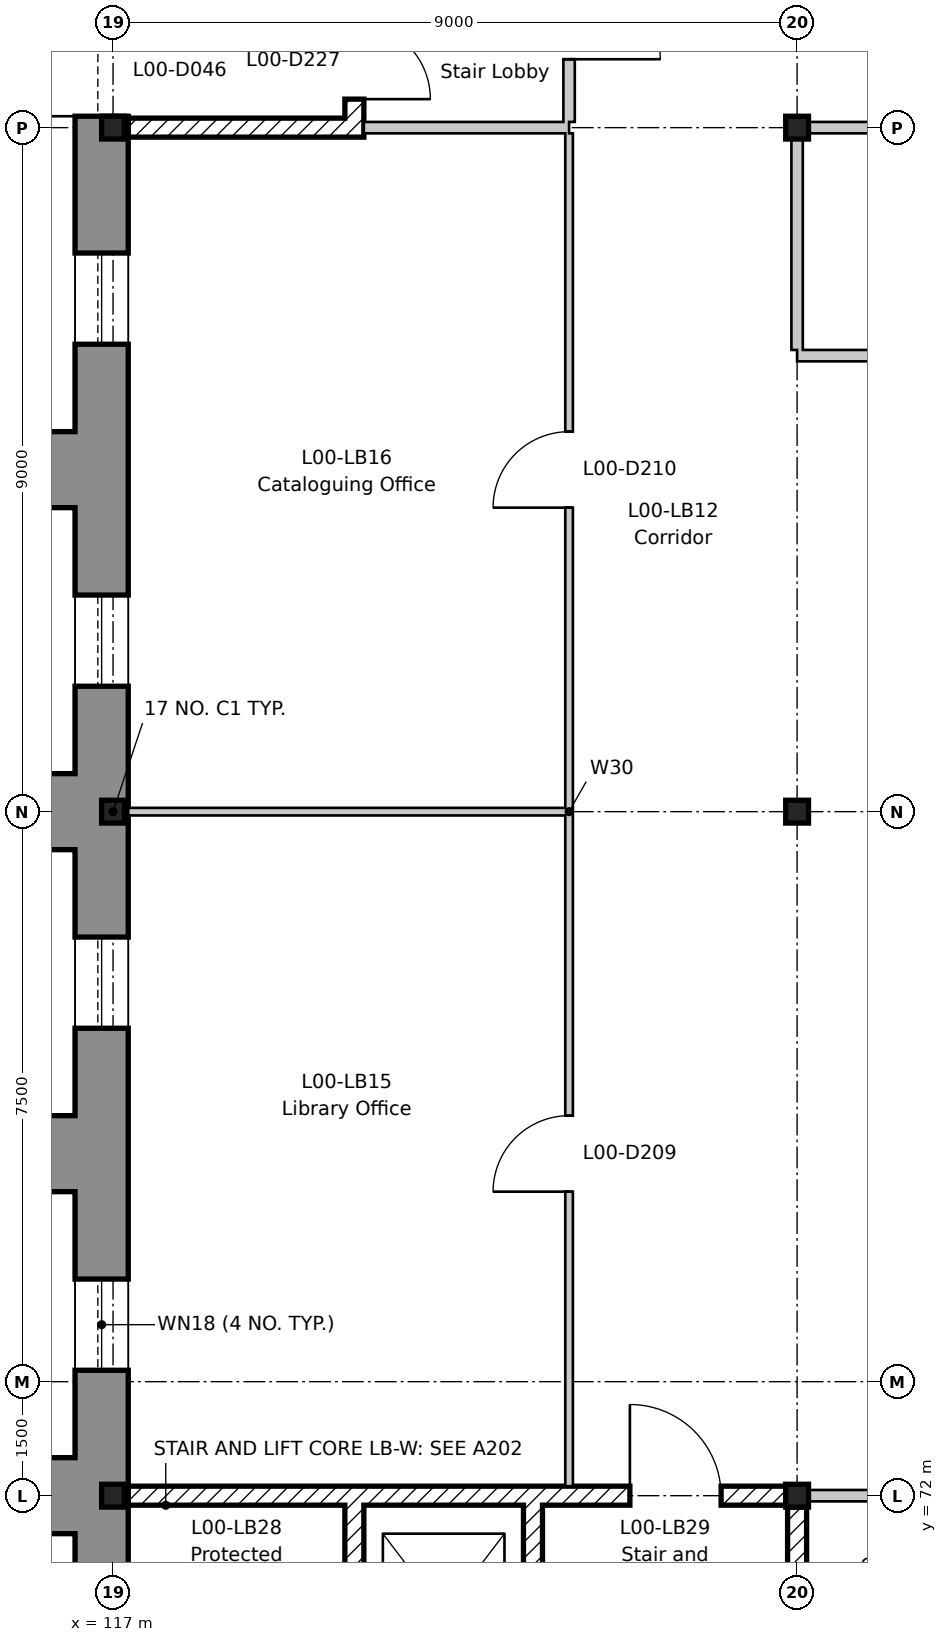
"""IFC4 building model, lengths in metres.
Left out: names, types, materials, properties, quantities, classifications, styles, units other than length and angle.
Written with IfcOpenShell. Run it as: python <this file> out.ifc"""

import sys

from ifc_helpers import new_model, si_unit, direction, frame, frame_2d, origin, origin_2d, place, context, subcontext, project, spatial, rectangle, i_section, extrude, element, fill, save


model = new_model("IFC4")
c1 = context("Model", 3, precision=1e-05, world=origin(), true_north=direction((0.0, 1.0)))
c2 = subcontext(c1, "Body", "Model", "MODEL_VIEW")
j1 = project(units=[si_unit("LENGTHUNIT", "METRE"), si_unit("PLANEANGLEUNIT", "RADIAN")], contexts=[c1])
p1 = place(None, origin())
s1 = spatial("IfcSite", under=j1, at=p1, CompositionType="ELEMENT")
p2 = place(p1, origin())
s2 = spatial("IfcBuilding", under=s1, at=p2, CompositionType="ELEMENT")
p3 = place(p2, origin())
s3 = spatial("IfcBuildingStorey", under=s2, at=p3, CompositionType="ELEMENT", Elevation=0.0)
for number, where, z_axis, x_axis in (
    (1, (117.0, 72.0, -0.6), (0.0, 0.0, 1.0), (1.0, 0.0, 0.0)),
    (2, (117.0, 81.0, -0.6), (0.0, 0.0, 1.0), (1.0, 0.0, 0.0)),
    (3, (117.0, 90.0, -0.6), (0.0, 0.0, 1.0), (1.0, 0.0, 0.0)),
    (4, (126.0, 72.0, -0.6), (0.0, 0.0, 1.0), (1.0, 0.0, 0.0)),
    (5, (126.0, 81.0, -0.6), (0.0, 0.0, 1.0), (1.0, 0.0, 0.0)),
    (6, (126.0, 90.0, -0.6), (0.0, 0.0, 1.0), (1.0, 0.0, 0.0)),
):
    element("IfcColumn", number, at=place(p3, frame(where, z_axis=z_axis, x_axis=x_axis)), inside=s3, PredefinedType="COLUMN", context=c2, shape_type="SweptSolid", body=[
        extrude(i_section(OverallWidth=0.3, OverallDepth=0.3, WebThickness=0.011, FlangeThickness=0.019, FilletRadius=0.027, at=origin_2d()), origin(), (0.0, 0.0, 1.0), 5.8),
    ])
p4 = place(p3, frame((120.175, 63.2, 0.0), z_axis=(0.0, 0.0, 1.0), x_axis=(0.0, 1.0, 0.0)))
e7 = element("IfcWall", 7, at=p4, inside=s3, PredefinedType="SHEAR", context=c2, shape_type="SweptSolid", body=[
    extrude(rectangle(XDim=8.675, YDim=0.25, at=frame_2d((4.337, 0.0))), origin(), (0.0, 0.0, 1.0), 5.2),
])
p5 = place(p4, frame((0.25, 0.0, 0.0)))
e8 = element("IfcOpeningElement", 8, at=p5, cuts=e7, PredefinedType="OPENING", context=c2, shape_type="SweptSolid", body=[
    extrude(rectangle(XDim=1.0, YDim=2.1, at=frame_2d((0.5, 1.05))), frame((0.0, 0.135, 0.0), z_axis=(0.0, -1.0, 0.0), x_axis=(1.0, 0.0, 0.0)), (0.0, 0.0, 1.0), 0.27),
])
p6 = place(p3, frame((126.0, 63.2, 0.0), z_axis=(0.0, 0.0, 1.0), x_axis=(0.0, 1.0, 0.0)))
e9 = element("IfcWall", 9, at=p6, inside=s3, PredefinedType="SHEAR", context=c2, shape_type="SweptSolid", body=[
    extrude(rectangle(XDim=8.65, YDim=0.25, at=frame_2d((4.325, 0.0))), origin(), (0.0, 0.0, 1.0), 5.2),
])
p7 = place(p3, frame((117.2, 72.0, 0.0), z_axis=(0.0, 0.0, 1.0), x_axis=(1.0, 0.0, 0.0)))
e10 = element("IfcWall", 10, at=p7, inside=s3, PredefinedType="SHEAR", context=c2, shape_type="SweptSolid", body=[
    extrude(rectangle(XDim=8.65, YDim=0.25, at=frame_2d((4.325, 0.0))), origin(), (0.0, 0.0, 1.0), 5.2),
])
p8 = place(p7, frame((6.6, 0.0, 0.0)))
e11 = element("IfcOpeningElement", 11, at=p8, cuts=e10, PredefinedType="OPENING", context=c2, shape_type="SweptSolid", body=[
    extrude(rectangle(XDim=1.2, YDim=2.1, at=frame_2d((0.6, 1.05))), frame((0.0, 0.135, 0.0), z_axis=(0.0, -1.0, 0.0), x_axis=(1.0, 0.0, 0.0)), (0.0, 0.0, 1.0), 0.27),
])
p9 = place(p3, frame((122.525, 69.275, 0.0), z_axis=(0.0, 0.0, 1.0), x_axis=(0.0, 1.0, 0.0)))
e12 = element("IfcWall", 12, at=p9, inside=s3, PredefinedType="SHEAR", context=c2, shape_type="SweptSolid", body=[
    extrude(rectangle(XDim=2.6, YDim=0.25, at=frame_2d((1.3, 0.0))), origin(), (0.0, 0.0, 1.0), 5.2),
])
for number, where, z_axis, x_axis in (
    (13, (122.525, 69.025, -1.2), (0.0, 0.0, 1.0), (0.0, 1.0, 0.0)),
    (14, (120.175, 69.025, -1.2), (0.0, 0.0, 1.0), (0.0, 1.0, 0.0)),
):
    element("IfcWall", number, at=place(p3, frame(where, z_axis=z_axis, x_axis=x_axis)), inside=s3, PredefinedType="SHEAR", context=c2, shape_type="SweptSolid", body=[
        extrude(rectangle(XDim=2.85, YDim=0.25, at=frame_2d((1.425, 0.0))), origin(), (0.0, 0.0, 1.0), 1.2),
    ])
p10 = place(p3, frame((120.05, 72.0, -1.2), z_axis=(0.0, 0.0, 1.0), x_axis=(1.0, 0.0, 0.0)))
e15 = element("IfcWall", 15, at=p10, inside=s3, PredefinedType="SHEAR", context=c2, shape_type="SweptSolid", body=[
    extrude(rectangle(XDim=2.6, YDim=0.25, at=frame_2d((1.3, 0.0))), origin(), (0.0, 0.0, 1.0), 1.2),
])
p11 = place(p3, frame((120.175, 90.125, 0.0), z_axis=(0.0, 0.0, 1.0), x_axis=(0.0, 1.0, 0.0)))
e16 = element("IfcWall", 16, at=p11, inside=s3, PredefinedType="SHEAR", context=c2, shape_type="SweptSolid", body=[
    extrude(rectangle(XDim=8.675, YDim=0.25, at=frame_2d((4.337, 0.0))), origin(), (0.0, 0.0, 1.0), 5.2),
])
p12 = place(p11, frame((0.25, 0.0, 0.0)))
e17 = element("IfcOpeningElement", 17, at=p12, cuts=e16, PredefinedType="OPENING", context=c2, shape_type="SweptSolid", body=[
    extrude(rectangle(XDim=1.0, YDim=2.1, at=frame_2d((0.5, 1.05))), frame((0.0, 0.135, 0.0), z_axis=(0.0, -1.0, 0.0), x_axis=(1.0, 0.0, 0.0)), (0.0, 0.0, 1.0), 0.27),
])
p13 = place(p3, frame((117.2, 90.0, 0.0), z_axis=(0.0, 0.0, 1.0), x_axis=(1.0, 0.0, 0.0)))
e18 = element("IfcWall", 18, at=p13, inside=s3, PredefinedType="SHEAR", context=c2, shape_type="SweptSolid", body=[
    extrude(rectangle(XDim=3.1, YDim=0.25, at=frame_2d((1.55, 0.0))), origin(), (0.0, 0.0, 1.0), 4.7),
])
p14 = place(p3, frame((116.85, 63.2, 0.0), z_axis=(0.0, 0.0, 1.0), x_axis=(0.0, 1.0, 0.0)))
e19 = element("IfcWall", 19, at=p14, inside=s3, PredefinedType="STANDARD", context=c2, shape_type="SweptSolid", body=[
    extrude(rectangle(XDim=35.6, YDim=0.7, at=frame_2d((17.8, 0.0))), origin(), (0.0, 0.0, 1.0), 5.2),
])
p15 = place(p14, frame((10.45, 0.0, 1.2)))
e20 = element("IfcOpeningElement", 20, at=p15, cuts=e19, PredefinedType="OPENING", context=c2, shape_type="SweptSolid", body=[
    extrude(rectangle(XDim=1.2, YDim=1.8, at=frame_2d((0.6, 0.9))), frame((0.0, 0.36, 0.0), z_axis=(0.0, -1.0, 0.0), x_axis=(1.0, 0.0, 0.0)), (0.0, 0.0, 1.0), 0.72),
])
p16 = place(p14, frame((14.95, 0.0, 1.2)))
e21 = element("IfcOpeningElement", 21, at=p16, cuts=e19, PredefinedType="OPENING", context=c2, shape_type="SweptSolid", body=[
    extrude(rectangle(XDim=1.2, YDim=1.8, at=frame_2d((0.6, 0.9))), frame((0.0, 0.36, 0.0), z_axis=(0.0, -1.0, 0.0), x_axis=(1.0, 0.0, 0.0)), (0.0, 0.0, 1.0), 0.72),
])
p17 = place(p14, frame((19.45, 0.0, 1.2)))
e22 = element("IfcOpeningElement", 22, at=p17, cuts=e19, PredefinedType="OPENING", context=c2, shape_type="SweptSolid", body=[
    extrude(rectangle(XDim=1.2, YDim=1.8, at=frame_2d((0.6, 0.9))), frame((0.0, 0.36, 0.0), z_axis=(0.0, -1.0, 0.0), x_axis=(1.0, 0.0, 0.0)), (0.0, 0.0, 1.0), 0.72),
])
p18 = place(p14, frame((23.95, 0.0, 1.2)))
e23 = element("IfcOpeningElement", 23, at=p18, cuts=e19, PredefinedType="OPENING", context=c2, shape_type="SweptSolid", body=[
    extrude(rectangle(XDim=1.2, YDim=1.8, at=frame_2d((0.6, 0.9))), frame((0.0, 0.36, 0.0), z_axis=(0.0, -1.0, 0.0), x_axis=(1.0, 0.0, 0.0)), (0.0, 0.0, 1.0), 0.72),
])
p19 = place(p14, frame((32.95, 0.0, 1.2)))
e24 = element("IfcOpeningElement", 24, at=p19, cuts=e19, PredefinedType="OPENING", context=c2, shape_type="SweptSolid", body=[
    extrude(rectangle(XDim=1.2, YDim=1.8, at=frame_2d((0.6, 0.9))), frame((0.0, 0.36, 0.0), z_axis=(0.0, -1.0, 0.0), x_axis=(1.0, 0.0, 0.0)), (0.0, 0.0, 1.0), 0.72),
])
p20 = place(p14, frame((26.95, 0.0, 0.0)))
e25 = element("IfcOpeningElement", 25, at=p20, cuts=e19, PredefinedType="OPENING", context=c2, shape_type="SweptSolid", body=[
    extrude(rectangle(XDim=1.2, YDim=2.1, at=frame_2d((0.6, 1.05))), frame((0.0, 0.36, 0.0), z_axis=(0.0, -1.0, 0.0), x_axis=(1.0, 0.0, 0.0)), (0.0, 0.0, 1.0), 0.72),
])
for number, where, z_axis, x_axis in (
    (26, (115.9, 71.5, 0.0), (0.0, 0.0, 1.0), (0.0, 1.0, 0.0)),
    (27, (115.9, 76.0, 0.0), (0.0, 0.0, 1.0), (0.0, 1.0, 0.0)),
    (28, (115.9, 80.5, 0.0), (0.0, 0.0, 1.0), (0.0, 1.0, 0.0)),
    (29, (115.9, 85.0, 0.0), (0.0, 0.0, 1.0), (0.0, 1.0, 0.0)),
):
    element("IfcWall", number, at=place(p3, frame(where, z_axis=z_axis, x_axis=x_axis)), inside=s3, PredefinedType="STANDARD", context=c2, shape_type="SweptSolid", body=[
        extrude(rectangle(XDim=1.0, YDim=1.2, at=frame_2d((0.5, 0.0))), origin(), (0.0, 0.0, 1.0), 5.4),
    ])
p21 = place(p3, frame((126.15, 72.0, 0.0), z_axis=(0.0, 0.0, 1.0), x_axis=(1.0, 0.0, 0.0)))
e30 = element("IfcWall", 30, at=p21, inside=s3, PredefinedType="PARTITIONING", context=c2, shape_type="SweptSolid", body=[
    extrude(rectangle(XDim=2.85, YDim=0.15, at=frame_2d((1.425, 0.0))), origin(), (0.0, 0.0, 1.0), 4.68),
])
p22 = place(p3, frame((117.2, 81.0, 0.0), z_axis=(0.0, 0.0, 1.0), x_axis=(1.0, 0.0, 0.0)))
e31 = element("IfcWall", 31, at=p22, inside=s3, PredefinedType="PARTITIONING", context=c2, shape_type="SweptSolid", body=[
    extrude(rectangle(XDim=5.75, YDim=0.1, at=frame_2d((2.875, 0.0))), origin(), (0.0, 0.0, 1.0), 4.68),
])
p23 = place(p3, frame((126.0, 87.0, 0.0), z_axis=(0.0, 0.0, 1.0), x_axis=(1.0, 0.0, 0.0)))
e32 = element("IfcWall", 32, at=p23, inside=s3, PredefinedType="PARTITIONING", context=c2, shape_type="SweptSolid", body=[
    extrude(rectangle(XDim=36.0, YDim=0.15, at=frame_2d((18.0, 0.0))), origin(), (0.0, 0.0, 1.0), 4.68),
])
p24 = place(p23, frame((5.5, 0.0, 0.0)))
e33 = element("IfcOpeningElement", 33, at=p24, cuts=e32, PredefinedType="OPENING", context=c2, shape_type="SweptSolid", body=[
    extrude(rectangle(XDim=1.0, YDim=2.1, at=frame_2d((0.5, 1.05))), frame((0.0, 0.085, 0.0), z_axis=(0.0, -1.0, 0.0), x_axis=(1.0, 0.0, 0.0)), (0.0, 0.0, 1.0), 0.17),
])
p25 = place(p23, frame((17.5, 0.0, 0.0)))
e34 = element("IfcOpeningElement", 34, at=p25, cuts=e32, PredefinedType="OPENING", context=c2, shape_type="SweptSolid", body=[
    extrude(rectangle(XDim=1.0, YDim=2.1, at=frame_2d((0.5, 1.05))), frame((0.0, 0.085, 0.0), z_axis=(0.0, -1.0, 0.0), x_axis=(1.0, 0.0, 0.0)), (0.0, 0.0, 1.0), 0.17),
])
p26 = place(p23, frame((29.5, 0.0, 0.0)))
e35 = element("IfcOpeningElement", 35, at=p26, cuts=e32, PredefinedType="OPENING", context=c2, shape_type="SweptSolid", body=[
    extrude(rectangle(XDim=1.0, YDim=2.1, at=frame_2d((0.5, 1.05))), frame((0.0, 0.085, 0.0), z_axis=(0.0, -1.0, 0.0), x_axis=(1.0, 0.0, 0.0)), (0.0, 0.0, 1.0), 0.17),
])
p27 = place(p3, frame((120.3, 90.0, 0.0), z_axis=(0.0, 0.0, 1.0), x_axis=(1.0, 0.0, 0.0)))
e36 = element("IfcWall", 36, at=p27, inside=s3, PredefinedType="PARTITIONING", context=c2, shape_type="SweptSolid", body=[
    extrude(rectangle(XDim=2.7, YDim=0.15, at=frame_2d((1.35, 0.0))), origin(), (0.0, 0.0, 1.0), 4.68),
])
p28 = place(p3, frame((126.15, 90.0, 0.0), z_axis=(0.0, 0.0, 1.0), x_axis=(1.0, 0.0, 0.0)))
e37 = element("IfcWall", 37, at=p28, inside=s3, PredefinedType="PARTITIONING", context=c2, shape_type="SweptSolid", body=[
    extrude(rectangle(XDim=8.7, YDim=0.15, at=frame_2d((4.35, 0.0))), origin(), (0.0, 0.0, 1.0), 4.68),
])
p29 = place(p3, frame((123.0, 90.075, 0.0), z_axis=(0.0, 0.0, 1.0), x_axis=(0.0, 1.0, 0.0)))
e38 = element("IfcWall", 38, at=p29, inside=s3, PredefinedType="PARTITIONING", context=c2, shape_type="SweptSolid", body=[
    extrude(rectangle(XDim=2.85, YDim=0.15, at=frame_2d((1.425, 0.0))), origin(), (0.0, 0.0, 1.0), 4.68),
])
p30 = place(p29, frame((0.825, 0.0, 0.0)))
e39 = element("IfcOpeningElement", 39, at=p30, cuts=e38, PredefinedType="OPENING", context=c2, shape_type="SweptSolid", body=[
    extrude(rectangle(XDim=1.2, YDim=2.1, at=frame_2d((0.6, 1.05))), frame((0.0, 0.085, 0.0), z_axis=(0.0, -1.0, 0.0), x_axis=(1.0, 0.0, 0.0)), (0.0, 0.0, 1.0), 0.17),
])
p31 = place(p3, frame((123.0, 72.125, 0.0), z_axis=(0.0, 0.0, 1.0), x_axis=(0.0, 1.0, 0.0)))
e40 = element("IfcWall", 40, at=p31, inside=s3, PredefinedType="PARTITIONING", context=c2, shape_type="SweptSolid", body=[
    extrude(rectangle(XDim=17.8, YDim=0.1, at=frame_2d((8.9, 0.0))), origin(), (0.0, 0.0, 1.0), 4.68),
])
p32 = place(p31, frame((3.875, 0.0, 0.0)))
e41 = element("IfcOpeningElement", 41, at=p32, cuts=e40, PredefinedType="OPENING", context=c2, shape_type="SweptSolid", body=[
    extrude(rectangle(XDim=1.0, YDim=2.1, at=frame_2d((0.5, 1.05))), frame((0.0, 0.06, 0.0), z_axis=(0.0, -1.0, 0.0), x_axis=(1.0, 0.0, 0.0)), (0.0, 0.0, 1.0), 0.12),
])
p33 = place(p31, frame((12.875, 0.0, 0.0)))
e42 = element("IfcOpeningElement", 42, at=p33, cuts=e40, PredefinedType="OPENING", context=c2, shape_type="SweptSolid", body=[
    extrude(rectangle(XDim=1.0, YDim=2.1, at=frame_2d((0.5, 1.05))), frame((0.0, 0.06, 0.0), z_axis=(0.0, -1.0, 0.0), x_axis=(1.0, 0.0, 0.0)), (0.0, 0.0, 1.0), 0.12),
])
p34 = place(p3, frame((126.0, 87.075, 0.0), z_axis=(0.0, 0.0, 1.0), x_axis=(0.0, 1.0, 0.0)))
e43 = element("IfcWall", 43, at=p34, inside=s3, PredefinedType="PARTITIONING", context=c2, shape_type="SweptSolid", body=[
    extrude(rectangle(XDim=2.775, YDim=0.15, at=frame_2d((1.388, 0.0))), origin(), (0.0, 0.0, 1.0), 4.68),
])
p35 = place(p15, origin())
e44 = element("IfcWindow", 44, at=p35, inside=s3, PartitioningType="SINGLE_PANEL", PredefinedType="WINDOW", context=c2, shape_type="SweptSolid", body=[
    extrude(rectangle(XDim=1.2, YDim=1.8, at=frame_2d((0.6, 0.9))), frame((0.0, 0.03, 0.0), z_axis=(0.0, -1.0, 0.0), x_axis=(1.0, 0.0, 0.0)), (0.0, 0.0, 1.0), 0.06),
])
fill(e20, e44)
p36 = place(p16, origin())
e45 = element("IfcWindow", 45, at=p36, inside=s3, PartitioningType="SINGLE_PANEL", PredefinedType="WINDOW", context=c2, shape_type="SweptSolid", body=[
    extrude(rectangle(XDim=1.2, YDim=1.8, at=frame_2d((0.6, 0.9))), frame((0.0, 0.03, 0.0), z_axis=(0.0, -1.0, 0.0), x_axis=(1.0, 0.0, 0.0)), (0.0, 0.0, 1.0), 0.06),
])
fill(e21, e45)
p37 = place(p17, origin())
e46 = element("IfcWindow", 46, at=p37, inside=s3, PartitioningType="SINGLE_PANEL", PredefinedType="WINDOW", context=c2, shape_type="SweptSolid", body=[
    extrude(rectangle(XDim=1.2, YDim=1.8, at=frame_2d((0.6, 0.9))), frame((0.0, 0.03, 0.0), z_axis=(0.0, -1.0, 0.0), x_axis=(1.0, 0.0, 0.0)), (0.0, 0.0, 1.0), 0.06),
])
fill(e22, e46)
p38 = place(p18, origin())
e47 = element("IfcWindow", 47, at=p38, inside=s3, PartitioningType="SINGLE_PANEL", PredefinedType="WINDOW", context=c2, shape_type="SweptSolid", body=[
    extrude(rectangle(XDim=1.2, YDim=1.8, at=frame_2d((0.6, 0.9))), frame((0.0, 0.03, 0.0), z_axis=(0.0, -1.0, 0.0), x_axis=(1.0, 0.0, 0.0)), (0.0, 0.0, 1.0), 0.06),
])
fill(e23, e47)
p39 = place(p20, origin())
e48 = element("IfcDoor", 48, at=p39, inside=s3, OperationType="SINGLE_SWING_LEFT", PredefinedType="DOOR", context=c2, shape_type="SweptSolid", body=[
    extrude(rectangle(XDim=1.2, YDim=2.1, at=frame_2d((0.6, 1.05))), frame((0.0, 0.025, 0.0), z_axis=(0.0, -1.0, 0.0), x_axis=(1.0, 0.0, 0.0)), (0.0, 0.0, 1.0), 0.05),
])
fill(e25, e48)
p40 = place(p32, origin())
e49 = element("IfcDoor", 49, at=p40, inside=s3, OperationType="SINGLE_SWING_LEFT", PredefinedType="DOOR", context=c2, shape_type="SweptSolid", body=[
    extrude(rectangle(XDim=1.0, YDim=2.1, at=frame_2d((0.5, 1.05))), frame((0.0, 0.025, 0.0), z_axis=(0.0, -1.0, 0.0), x_axis=(1.0, 0.0, 0.0)), (0.0, 0.0, 1.0), 0.05),
])
fill(e41, e49)
p41 = place(p33, origin())
e50 = element("IfcDoor", 50, at=p41, inside=s3, OperationType="SINGLE_SWING_LEFT", PredefinedType="DOOR", context=c2, shape_type="SweptSolid", body=[
    extrude(rectangle(XDim=1.0, YDim=2.1, at=frame_2d((0.5, 1.05))), frame((0.0, 0.025, 0.0), z_axis=(0.0, -1.0, 0.0), x_axis=(1.0, 0.0, 0.0)), (0.0, 0.0, 1.0), 0.05),
])
fill(e42, e50)
p42 = place(p30, frame((1.2, 0.0, 0.0), z_axis=(0.0, 0.0, 1.0), x_axis=(-1.0, 0.0, 0.0)))
e51 = element("IfcDoor", 51, at=p42, inside=s3, OperationType="SINGLE_SWING_RIGHT", PredefinedType="DOOR", context=c2, shape_type="SweptSolid", body=[
    extrude(rectangle(XDim=1.2, YDim=2.1, at=frame_2d((0.6, 1.05))), frame((0.0, 0.025, 0.0), z_axis=(0.0, -1.0, 0.0), x_axis=(1.0, 0.0, 0.0)), (0.0, 0.0, 1.0), 0.05),
])
fill(e39, e51)
p43 = place(p8, origin())
e52 = element("IfcDoor", 52, at=p43, inside=s3, OperationType="SINGLE_SWING_LEFT", PredefinedType="DOOR", context=c2, shape_type="SweptSolid", body=[
    extrude(rectangle(XDim=1.2, YDim=2.1, at=frame_2d((0.6, 1.05))), frame((0.0, 0.025, 0.0), z_axis=(0.0, -1.0, 0.0), x_axis=(1.0, 0.0, 0.0)), (0.0, 0.0, 1.0), 0.05),
])
fill(e11, e52)
p44 = place(p12, frame((1.0, 0.0, 0.0), z_axis=(0.0, 0.0, 1.0), x_axis=(-1.0, 0.0, 0.0)))
e53 = element("IfcDoor", 53, at=p44, inside=s3, OperationType="SINGLE_SWING_RIGHT", PredefinedType="DOOR", context=c2, shape_type="SweptSolid", body=[
    extrude(rectangle(XDim=1.0, YDim=2.1, at=frame_2d((0.5, 1.05))), frame((0.0, 0.025, 0.0), z_axis=(0.0, -1.0, 0.0), x_axis=(1.0, 0.0, 0.0)), (0.0, 0.0, 1.0), 0.05),
])
fill(e17, e53)
save(model, sys.argv[1])
